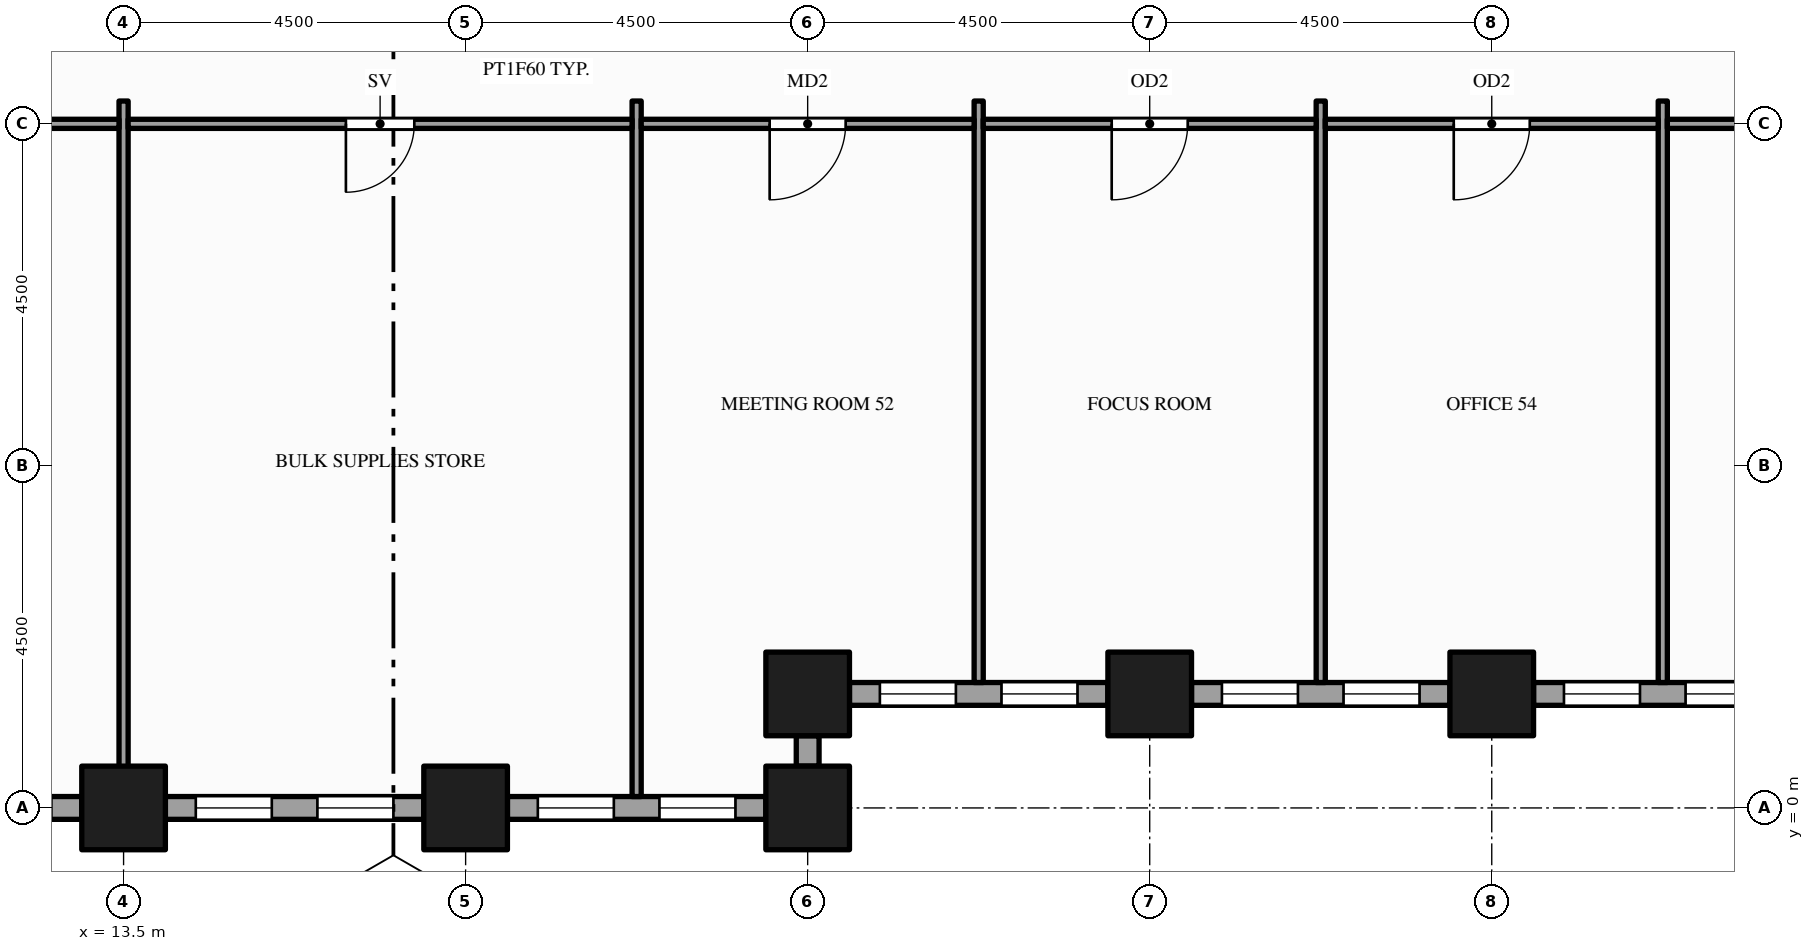
"""IFC4 building model, lengths in metres.
Left out: names, types, materials, properties, quantities, classifications, styles, units other than length and angle.
Written with IfcOpenShell. Run it as: python <this file> out.ifc"""

import sys

from ifc_helpers import new_model, si_unit, direction, frame, frame_2d, origin, origin_2d, place, context, subcontext, project, spatial, rectangle, hollow_rectangle, extrude, element, fill, save


model = new_model("IFC4")
c1 = context("Model", 3, precision=1e-05, world=origin(), true_north=direction((0.0, 1.0)))
c2 = subcontext(c1, "Body", "Model", "MODEL_VIEW")
j1 = project(units=[si_unit("LENGTHUNIT", "METRE"), si_unit("PLANEANGLEUNIT", "RADIAN")], contexts=[c1])
p1 = place(None, origin())
s1 = spatial("IfcSite", under=j1, at=p1, CompositionType="ELEMENT")
p2 = place(p1, origin())
s2 = spatial("IfcBuilding", under=s1, at=p2, CompositionType="ELEMENT")
p3 = place(p2, frame((0.0, 0.0, 33.0)))
s3 = spatial("IfcBuildingStorey", under=s2, at=p3, CompositionType="ELEMENT", Elevation=33.0)
for number, where, z_axis, x_axis in (
    (1, (13.5, 0.0, -0.15), (0.0, 0.0, 1.0), (1.0, 0.0, 0.0)),
    (2, (18.0, 0.0, -0.15), (0.0, 0.0, 1.0), (1.0, 0.0, 0.0)),
    (3, (22.5, 0.0, -0.15), (0.0, 0.0, 1.0), (1.0, 0.0, 0.0)),
    (4, (22.5, 1.5, -0.15), (0.0, 0.0, 1.0), (1.0, 0.0, 0.0)),
    (5, (27.0, 1.5, -0.15), (0.0, 0.0, 1.0), (1.0, 0.0, 0.0)),
    (6, (31.5, 1.5, -0.15), (0.0, 0.0, 1.0), (1.0, 0.0, 0.0)),
):
    element("IfcColumn", number, at=place(p3, frame(where, z_axis=z_axis, x_axis=x_axis)), inside=s3, PredefinedType="COLUMN", context=c2, shape_type="SweptSolid", body=[
        extrude(hollow_rectangle(XDim=1.1, YDim=1.1, WallThickness=0.06, at=origin_2d()), origin(), (0.0, 0.0, 1.0), 4.0),
    ])
p4 = place(p3, frame((9.55, 0.0, 0.0), z_axis=(0.0, 0.0, 1.0), x_axis=(1.0, 0.0, 0.0)))
e7 = element("IfcWall", 7, at=p4, inside=s3, PredefinedType="STANDARD", context=c2, shape_type="SweptSolid", body=[
    extrude(rectangle(XDim=3.4, YDim=0.3, at=frame_2d((1.7, 0.0))), origin(), (0.0, 0.0, 1.0), 3.144),
])
p5 = place(p4, frame((0.4, 0.0, 0.9)))
e8 = element("IfcOpeningElement", 8, at=p5, cuts=e7, PredefinedType="OPENING", context=c2, shape_type="SweptSolid", body=[
    extrude(rectangle(XDim=1.0, YDim=2.0, at=frame_2d((0.5, 1.0))), frame((0.0, 0.16, 0.0), z_axis=(0.0, -1.0, 0.0), x_axis=(1.0, 0.0, 0.0)), (0.0, 0.0, 1.0), 0.32),
])
p6 = place(p4, frame((2.0, 0.0, 0.9)))
e9 = element("IfcOpeningElement", 9, at=p6, cuts=e7, PredefinedType="OPENING", context=c2, shape_type="SweptSolid", body=[
    extrude(rectangle(XDim=1.0, YDim=2.0, at=frame_2d((0.5, 1.0))), frame((0.0, 0.16, 0.0), z_axis=(0.0, -1.0, 0.0), x_axis=(1.0, 0.0, 0.0)), (0.0, 0.0, 1.0), 0.32),
])
p7 = place(p3, frame((14.05, 0.0, 0.0), z_axis=(0.0, 0.0, 1.0), x_axis=(1.0, 0.0, 0.0)))
e10 = element("IfcWall", 10, at=p7, inside=s3, PredefinedType="STANDARD", context=c2, shape_type="SweptSolid", body=[
    extrude(rectangle(XDim=3.4, YDim=0.3, at=frame_2d((1.7, 0.0))), origin(), (0.0, 0.0, 1.0), 3.144),
])
p8 = place(p7, frame((0.4, 0.0, 0.9)))
e11 = element("IfcOpeningElement", 11, at=p8, cuts=e10, PredefinedType="OPENING", context=c2, shape_type="SweptSolid", body=[
    extrude(rectangle(XDim=1.0, YDim=2.0, at=frame_2d((0.5, 1.0))), frame((0.0, 0.16, 0.0), z_axis=(0.0, -1.0, 0.0), x_axis=(1.0, 0.0, 0.0)), (0.0, 0.0, 1.0), 0.32),
])
p9 = place(p7, frame((2.0, 0.0, 0.9)))
e12 = element("IfcOpeningElement", 12, at=p9, cuts=e10, PredefinedType="OPENING", context=c2, shape_type="SweptSolid", body=[
    extrude(rectangle(XDim=1.0, YDim=2.0, at=frame_2d((0.5, 1.0))), frame((0.0, 0.16, 0.0), z_axis=(0.0, -1.0, 0.0), x_axis=(1.0, 0.0, 0.0)), (0.0, 0.0, 1.0), 0.32),
])
p10 = place(p3, frame((18.55, 0.0, 0.0), z_axis=(0.0, 0.0, 1.0), x_axis=(1.0, 0.0, 0.0)))
e13 = element("IfcWall", 13, at=p10, inside=s3, PredefinedType="STANDARD", context=c2, shape_type="SweptSolid", body=[
    extrude(rectangle(XDim=3.4, YDim=0.3, at=frame_2d((1.7, 0.0))), origin(), (0.0, 0.0, 1.0), 3.144),
])
p11 = place(p10, frame((0.4, 0.0, 0.9)))
e14 = element("IfcOpeningElement", 14, at=p11, cuts=e13, PredefinedType="OPENING", context=c2, shape_type="SweptSolid", body=[
    extrude(rectangle(XDim=1.0, YDim=2.0, at=frame_2d((0.5, 1.0))), frame((0.0, 0.16, 0.0), z_axis=(0.0, -1.0, 0.0), x_axis=(1.0, 0.0, 0.0)), (0.0, 0.0, 1.0), 0.32),
])
p12 = place(p10, frame((2.0, 0.0, 0.9)))
e15 = element("IfcOpeningElement", 15, at=p12, cuts=e13, PredefinedType="OPENING", context=c2, shape_type="SweptSolid", body=[
    extrude(rectangle(XDim=1.0, YDim=2.0, at=frame_2d((0.5, 1.0))), frame((0.0, 0.16, 0.0), z_axis=(0.0, -1.0, 0.0), x_axis=(1.0, 0.0, 0.0)), (0.0, 0.0, 1.0), 0.32),
])
p13 = place(p3, frame((22.5, 0.55, 0.0), z_axis=(0.0, 0.0, 1.0), x_axis=(0.0, 1.0, 0.0)))
e16 = element("IfcWall", 16, at=p13, inside=s3, PredefinedType="STANDARD", context=c2, shape_type="SweptSolid", body=[
    extrude(rectangle(XDim=0.4, YDim=0.3, at=frame_2d((0.2, 0.0))), origin(), (0.0, 0.0, 1.0), 3.144),
])
p14 = place(p3, frame((23.05, 1.5, 0.0), z_axis=(0.0, 0.0, 1.0), x_axis=(1.0, 0.0, 0.0)))
e17 = element("IfcWall", 17, at=p14, inside=s3, PredefinedType="STANDARD", context=c2, shape_type="SweptSolid", body=[
    extrude(rectangle(XDim=3.4, YDim=0.3, at=frame_2d((1.7, 0.0))), origin(), (0.0, 0.0, 1.0), 3.144),
])
p15 = place(p14, frame((0.4, 0.0, 0.9)))
e18 = element("IfcOpeningElement", 18, at=p15, cuts=e17, PredefinedType="OPENING", context=c2, shape_type="SweptSolid", body=[
    extrude(rectangle(XDim=1.0, YDim=2.0, at=frame_2d((0.5, 1.0))), frame((0.0, 0.16, 0.0), z_axis=(0.0, -1.0, 0.0), x_axis=(1.0, 0.0, 0.0)), (0.0, 0.0, 1.0), 0.32),
])
p16 = place(p14, frame((2.0, 0.0, 0.9)))
e19 = element("IfcOpeningElement", 19, at=p16, cuts=e17, PredefinedType="OPENING", context=c2, shape_type="SweptSolid", body=[
    extrude(rectangle(XDim=1.0, YDim=2.0, at=frame_2d((0.5, 1.0))), frame((0.0, 0.16, 0.0), z_axis=(0.0, -1.0, 0.0), x_axis=(1.0, 0.0, 0.0)), (0.0, 0.0, 1.0), 0.32),
])
p17 = place(p3, frame((27.55, 1.5, 0.0), z_axis=(0.0, 0.0, 1.0), x_axis=(1.0, 0.0, 0.0)))
e20 = element("IfcWall", 20, at=p17, inside=s3, PredefinedType="STANDARD", context=c2, shape_type="SweptSolid", body=[
    extrude(rectangle(XDim=3.4, YDim=0.3, at=frame_2d((1.7, 0.0))), origin(), (0.0, 0.0, 1.0), 3.144),
])
p18 = place(p17, frame((0.4, 0.0, 0.9)))
e21 = element("IfcOpeningElement", 21, at=p18, cuts=e20, PredefinedType="OPENING", context=c2, shape_type="SweptSolid", body=[
    extrude(rectangle(XDim=1.0, YDim=2.0, at=frame_2d((0.5, 1.0))), frame((0.0, 0.16, 0.0), z_axis=(0.0, -1.0, 0.0), x_axis=(1.0, 0.0, 0.0)), (0.0, 0.0, 1.0), 0.32),
])
p19 = place(p17, frame((2.0, 0.0, 0.9)))
e22 = element("IfcOpeningElement", 22, at=p19, cuts=e20, PredefinedType="OPENING", context=c2, shape_type="SweptSolid", body=[
    extrude(rectangle(XDim=1.0, YDim=2.0, at=frame_2d((0.5, 1.0))), frame((0.0, 0.16, 0.0), z_axis=(0.0, -1.0, 0.0), x_axis=(1.0, 0.0, 0.0)), (0.0, 0.0, 1.0), 0.32),
])
p20 = place(p3, frame((32.05, 1.5, 0.0), z_axis=(0.0, 0.0, 1.0), x_axis=(1.0, 0.0, 0.0)))
e23 = element("IfcWall", 23, at=p20, inside=s3, PredefinedType="STANDARD", context=c2, shape_type="SweptSolid", body=[
    extrude(rectangle(XDim=3.4, YDim=0.3, at=frame_2d((1.7, 0.0))), origin(), (0.0, 0.0, 1.0), 3.144),
])
p21 = place(p20, frame((0.4, 0.0, 0.9)))
e24 = element("IfcOpeningElement", 24, at=p21, cuts=e23, PredefinedType="OPENING", context=c2, shape_type="SweptSolid", body=[
    extrude(rectangle(XDim=1.0, YDim=2.0, at=frame_2d((0.5, 1.0))), frame((0.0, 0.16, 0.0), z_axis=(0.0, -1.0, 0.0), x_axis=(1.0, 0.0, 0.0)), (0.0, 0.0, 1.0), 0.32),
])
p22 = place(p20, frame((2.0, 0.0, 0.9)))
e25 = element("IfcOpeningElement", 25, at=p22, cuts=e23, PredefinedType="OPENING", context=c2, shape_type="SweptSolid", body=[
    extrude(rectangle(XDim=1.0, YDim=2.0, at=frame_2d((0.5, 1.0))), frame((0.0, 0.16, 0.0), z_axis=(0.0, -1.0, 0.0), x_axis=(1.0, 0.0, 0.0)), (0.0, 0.0, 1.0), 0.32),
])
for number, where, z_axis, x_axis in (
    (26, (13.5, 0.15, 0.0), (0.0, 0.0, 1.0), (0.0, 1.0, 0.0)),
    (27, (20.25, 0.15, 0.0), (0.0, 0.0, 1.0), (0.0, 1.0, 0.0)),
):
    element("IfcWall", number, at=place(p3, frame(where, z_axis=z_axis, x_axis=x_axis)), inside=s3, PredefinedType="PARTITIONING", context=c2, shape_type="SweptSolid", body=[
        extrude(rectangle(XDim=9.15, YDim=0.12, at=frame_2d((4.575, 0.0))), origin(), (0.0, 0.0, 1.0), 2.938),
    ])
for number, where, z_axis, x_axis in (
    (28, (24.75, 1.65, 0.0), (0.0, 0.0, 1.0), (0.0, 1.0, 0.0)),
    (29, (29.25, 1.65, 0.0), (0.0, 0.0, 1.0), (0.0, 1.0, 0.0)),
    (30, (33.75, 1.65, 0.0), (0.0, 0.0, 1.0), (0.0, 1.0, 0.0)),
):
    element("IfcWall", number, at=place(p3, frame(where, z_axis=z_axis, x_axis=x_axis)), inside=s3, PredefinedType="PARTITIONING", context=c2, shape_type="SweptSolid", body=[
        extrude(rectangle(XDim=7.65, YDim=0.12, at=frame_2d((3.825, 0.0))), origin(), (0.0, 0.0, 1.0), 2.938),
    ])
p23 = place(p3, frame((9.06, 9.0, 0.0), z_axis=(0.0, 0.0, 1.0), x_axis=(1.0, 0.0, 0.0)))
e31 = element("IfcWall", 31, at=p23, inside=s3, PredefinedType="PARTITIONING", context=c2, shape_type="SweptSolid", body=[
    extrude(rectangle(XDim=4.38, YDim=0.12, at=frame_2d((2.19, 0.0))), origin(), (0.0, 0.0, 1.0), 2.938),
])
p24 = place(p23, frame((1.69, 0.0, 0.0)))
e32 = element("IfcOpeningElement", 32, at=p24, cuts=e31, PredefinedType="OPENING", context=c2, shape_type="SweptSolid", body=[
    extrude(rectangle(XDim=1.0, YDim=2.1, at=frame_2d((0.5, 1.05))), frame((0.0, 0.07, 0.0), z_axis=(0.0, -1.0, 0.0), x_axis=(1.0, 0.0, 0.0)), (0.0, 0.0, 1.0), 0.14),
])
p25 = place(p3, frame((13.56, 9.0, 0.0), z_axis=(0.0, 0.0, 1.0), x_axis=(1.0, 0.0, 0.0)))
e33 = element("IfcWall", 33, at=p25, inside=s3, PredefinedType="PARTITIONING", context=c2, shape_type="SweptSolid", body=[
    extrude(rectangle(XDim=6.63, YDim=0.12, at=frame_2d((3.315, 0.0))), origin(), (0.0, 0.0, 1.0), 2.938),
])
p26 = place(p25, frame((2.865, 0.0, 0.0)))
e34 = element("IfcOpeningElement", 34, at=p26, cuts=e33, PredefinedType="OPENING", context=c2, shape_type="SweptSolid", body=[
    extrude(rectangle(XDim=0.9, YDim=2.1, at=frame_2d((0.45, 1.05))), frame((0.0, 0.07, 0.0), z_axis=(0.0, -1.0, 0.0), x_axis=(1.0, 0.0, 0.0)), (0.0, 0.0, 1.0), 0.14),
])
p27 = place(p3, frame((20.31, 9.0, 0.0), z_axis=(0.0, 0.0, 1.0), x_axis=(1.0, 0.0, 0.0)))
e35 = element("IfcWall", 35, at=p27, inside=s3, PredefinedType="PARTITIONING", context=c2, shape_type="SweptSolid", body=[
    extrude(rectangle(XDim=4.38, YDim=0.12, at=frame_2d((2.19, 0.0))), origin(), (0.0, 0.0, 1.0), 2.938),
])
p28 = place(p27, frame((1.69, 0.0, 0.0)))
e36 = element("IfcOpeningElement", 36, at=p28, cuts=e35, PredefinedType="OPENING", context=c2, shape_type="SweptSolid", body=[
    extrude(rectangle(XDim=1.0, YDim=2.1, at=frame_2d((0.5, 1.05))), frame((0.0, 0.07, 0.0), z_axis=(0.0, -1.0, 0.0), x_axis=(1.0, 0.0, 0.0)), (0.0, 0.0, 1.0), 0.14),
])
p29 = place(p3, frame((24.81, 9.0, 0.0), z_axis=(0.0, 0.0, 1.0), x_axis=(1.0, 0.0, 0.0)))
e37 = element("IfcWall", 37, at=p29, inside=s3, PredefinedType="PARTITIONING", context=c2, shape_type="SweptSolid", body=[
    extrude(rectangle(XDim=4.38, YDim=0.12, at=frame_2d((2.19, 0.0))), origin(), (0.0, 0.0, 1.0), 2.938),
])
p30 = place(p29, frame((1.69, 0.0, 0.0)))
e38 = element("IfcOpeningElement", 38, at=p30, cuts=e37, PredefinedType="OPENING", context=c2, shape_type="SweptSolid", body=[
    extrude(rectangle(XDim=1.0, YDim=2.1, at=frame_2d((0.5, 1.05))), frame((0.0, 0.07, 0.0), z_axis=(0.0, -1.0, 0.0), x_axis=(1.0, 0.0, 0.0)), (0.0, 0.0, 1.0), 0.14),
])
p31 = place(p3, frame((29.31, 9.0, 0.0), z_axis=(0.0, 0.0, 1.0), x_axis=(1.0, 0.0, 0.0)))
e39 = element("IfcWall", 39, at=p31, inside=s3, PredefinedType="PARTITIONING", context=c2, shape_type="SweptSolid", body=[
    extrude(rectangle(XDim=4.38, YDim=0.12, at=frame_2d((2.19, 0.0))), origin(), (0.0, 0.0, 1.0), 2.938),
])
p32 = place(p31, frame((1.69, 0.0, 0.0)))
e40 = element("IfcOpeningElement", 40, at=p32, cuts=e39, PredefinedType="OPENING", context=c2, shape_type="SweptSolid", body=[
    extrude(rectangle(XDim=1.0, YDim=2.1, at=frame_2d((0.5, 1.05))), frame((0.0, 0.07, 0.0), z_axis=(0.0, -1.0, 0.0), x_axis=(1.0, 0.0, 0.0)), (0.0, 0.0, 1.0), 0.14),
])
p33 = place(p3, frame((33.81, 9.0, 0.0), z_axis=(0.0, 0.0, 1.0), x_axis=(1.0, 0.0, 0.0)))
e41 = element("IfcWall", 41, at=p33, inside=s3, PredefinedType="PARTITIONING", context=c2, shape_type="SweptSolid", body=[
    extrude(rectangle(XDim=6.63, YDim=0.12, at=frame_2d((3.315, 0.0))), origin(), (0.0, 0.0, 1.0), 2.938),
])
p34 = place(p33, frame((2.865, 0.0, 0.0)))
e42 = element("IfcOpeningElement", 42, at=p34, cuts=e41, PredefinedType="OPENING", context=c2, shape_type="SweptSolid", body=[
    extrude(rectangle(XDim=0.9, YDim=2.1, at=frame_2d((0.45, 1.05))), frame((0.0, 0.07, 0.0), z_axis=(0.0, -1.0, 0.0), x_axis=(1.0, 0.0, 0.0)), (0.0, 0.0, 1.0), 0.14),
])
p35 = place(p8, origin())
e43 = element("IfcWindow", 43, at=p35, inside=s3, PartitioningType="SINGLE_PANEL", PredefinedType="WINDOW", context=c2, shape_type="SweptSolid", body=[
    extrude(rectangle(XDim=1.0, YDim=2.0, at=frame_2d((0.5, 1.0))), frame((0.0, 0.03, 0.0), z_axis=(0.0, -1.0, 0.0), x_axis=(1.0, 0.0, 0.0)), (0.0, 0.0, 1.0), 0.06),
])
fill(e11, e43)
p36 = place(p9, origin())
e44 = element("IfcWindow", 44, at=p36, inside=s3, PartitioningType="SINGLE_PANEL", PredefinedType="WINDOW", context=c2, shape_type="SweptSolid", body=[
    extrude(rectangle(XDim=1.0, YDim=2.0, at=frame_2d((0.5, 1.0))), frame((0.0, 0.03, 0.0), z_axis=(0.0, -1.0, 0.0), x_axis=(1.0, 0.0, 0.0)), (0.0, 0.0, 1.0), 0.06),
])
fill(e12, e44)
p37 = place(p11, origin())
e45 = element("IfcWindow", 45, at=p37, inside=s3, PartitioningType="SINGLE_PANEL", PredefinedType="WINDOW", context=c2, shape_type="SweptSolid", body=[
    extrude(rectangle(XDim=1.0, YDim=2.0, at=frame_2d((0.5, 1.0))), frame((0.0, 0.03, 0.0), z_axis=(0.0, -1.0, 0.0), x_axis=(1.0, 0.0, 0.0)), (0.0, 0.0, 1.0), 0.06),
])
fill(e14, e45)
p38 = place(p12, origin())
e46 = element("IfcWindow", 46, at=p38, inside=s3, PartitioningType="SINGLE_PANEL", PredefinedType="WINDOW", context=c2, shape_type="SweptSolid", body=[
    extrude(rectangle(XDim=1.0, YDim=2.0, at=frame_2d((0.5, 1.0))), frame((0.0, 0.03, 0.0), z_axis=(0.0, -1.0, 0.0), x_axis=(1.0, 0.0, 0.0)), (0.0, 0.0, 1.0), 0.06),
])
fill(e15, e46)
p39 = place(p15, origin())
e47 = element("IfcWindow", 47, at=p39, inside=s3, PartitioningType="SINGLE_PANEL", PredefinedType="WINDOW", context=c2, shape_type="SweptSolid", body=[
    extrude(rectangle(XDim=1.0, YDim=2.0, at=frame_2d((0.5, 1.0))), frame((0.0, 0.03, 0.0), z_axis=(0.0, -1.0, 0.0), x_axis=(1.0, 0.0, 0.0)), (0.0, 0.0, 1.0), 0.06),
])
fill(e18, e47)
p40 = place(p16, origin())
e48 = element("IfcWindow", 48, at=p40, inside=s3, PartitioningType="SINGLE_PANEL", PredefinedType="WINDOW", context=c2, shape_type="SweptSolid", body=[
    extrude(rectangle(XDim=1.0, YDim=2.0, at=frame_2d((0.5, 1.0))), frame((0.0, 0.03, 0.0), z_axis=(0.0, -1.0, 0.0), x_axis=(1.0, 0.0, 0.0)), (0.0, 0.0, 1.0), 0.06),
])
fill(e19, e48)
p41 = place(p18, origin())
e49 = element("IfcWindow", 49, at=p41, inside=s3, PartitioningType="SINGLE_PANEL", PredefinedType="WINDOW", context=c2, shape_type="SweptSolid", body=[
    extrude(rectangle(XDim=1.0, YDim=2.0, at=frame_2d((0.5, 1.0))), frame((0.0, 0.03, 0.0), z_axis=(0.0, -1.0, 0.0), x_axis=(1.0, 0.0, 0.0)), (0.0, 0.0, 1.0), 0.06),
])
fill(e21, e49)
p42 = place(p19, origin())
e50 = element("IfcWindow", 50, at=p42, inside=s3, PartitioningType="SINGLE_PANEL", PredefinedType="WINDOW", context=c2, shape_type="SweptSolid", body=[
    extrude(rectangle(XDim=1.0, YDim=2.0, at=frame_2d((0.5, 1.0))), frame((0.0, 0.03, 0.0), z_axis=(0.0, -1.0, 0.0), x_axis=(1.0, 0.0, 0.0)), (0.0, 0.0, 1.0), 0.06),
])
fill(e22, e50)
p43 = place(p21, origin())
e51 = element("IfcWindow", 51, at=p43, inside=s3, PartitioningType="SINGLE_PANEL", PredefinedType="WINDOW", context=c2, shape_type="SweptSolid", body=[
    extrude(rectangle(XDim=1.0, YDim=2.0, at=frame_2d((0.5, 1.0))), frame((0.0, 0.03, 0.0), z_axis=(0.0, -1.0, 0.0), x_axis=(1.0, 0.0, 0.0)), (0.0, 0.0, 1.0), 0.06),
])
fill(e24, e51)
p44 = place(p22, origin())
e52 = element("IfcWindow", 52, at=p44, inside=s3, PartitioningType="SINGLE_PANEL", PredefinedType="WINDOW", context=c2, shape_type="SweptSolid", body=[
    extrude(rectangle(XDim=1.0, YDim=2.0, at=frame_2d((0.5, 1.0))), frame((0.0, 0.03, 0.0), z_axis=(0.0, -1.0, 0.0), x_axis=(1.0, 0.0, 0.0)), (0.0, 0.0, 1.0), 0.06),
])
fill(e25, e52)
p45 = place(p26, origin())
e53 = element("IfcDoor", 53, at=p45, inside=s3, OperationType="SINGLE_SWING_LEFT", PredefinedType="DOOR", context=c2, shape_type="SweptSolid", body=[
    extrude(rectangle(XDim=0.9, YDim=2.1, at=frame_2d((0.45, 1.05))), frame((0.0, 0.025, 0.0), z_axis=(0.0, -1.0, 0.0), x_axis=(1.0, 0.0, 0.0)), (0.0, 0.0, 1.0), 0.05),
])
fill(e34, e53)
p46 = place(p28, origin())
e54 = element("IfcDoor", 54, at=p46, inside=s3, OperationType="SINGLE_SWING_LEFT", PredefinedType="DOOR", context=c2, shape_type="SweptSolid", body=[
    extrude(rectangle(XDim=1.0, YDim=2.1, at=frame_2d((0.5, 1.05))), frame((0.0, 0.025, 0.0), z_axis=(0.0, -1.0, 0.0), x_axis=(1.0, 0.0, 0.0)), (0.0, 0.0, 1.0), 0.05),
])
fill(e36, e54)
p47 = place(p30, origin())
e55 = element("IfcDoor", 55, at=p47, inside=s3, OperationType="SINGLE_SWING_LEFT", PredefinedType="DOOR", context=c2, shape_type="SweptSolid", body=[
    extrude(rectangle(XDim=1.0, YDim=2.1, at=frame_2d((0.5, 1.05))), frame((0.0, 0.025, 0.0), z_axis=(0.0, -1.0, 0.0), x_axis=(1.0, 0.0, 0.0)), (0.0, 0.0, 1.0), 0.05),
])
fill(e38, e55)
p48 = place(p32, origin())
e56 = element("IfcDoor", 56, at=p48, inside=s3, OperationType="SINGLE_SWING_LEFT", PredefinedType="DOOR", context=c2, shape_type="SweptSolid", body=[
    extrude(rectangle(XDim=1.0, YDim=2.1, at=frame_2d((0.5, 1.05))), frame((0.0, 0.025, 0.0), z_axis=(0.0, -1.0, 0.0), x_axis=(1.0, 0.0, 0.0)), (0.0, 0.0, 1.0), 0.05),
])
fill(e40, e56)
save(model, sys.argv[1])
